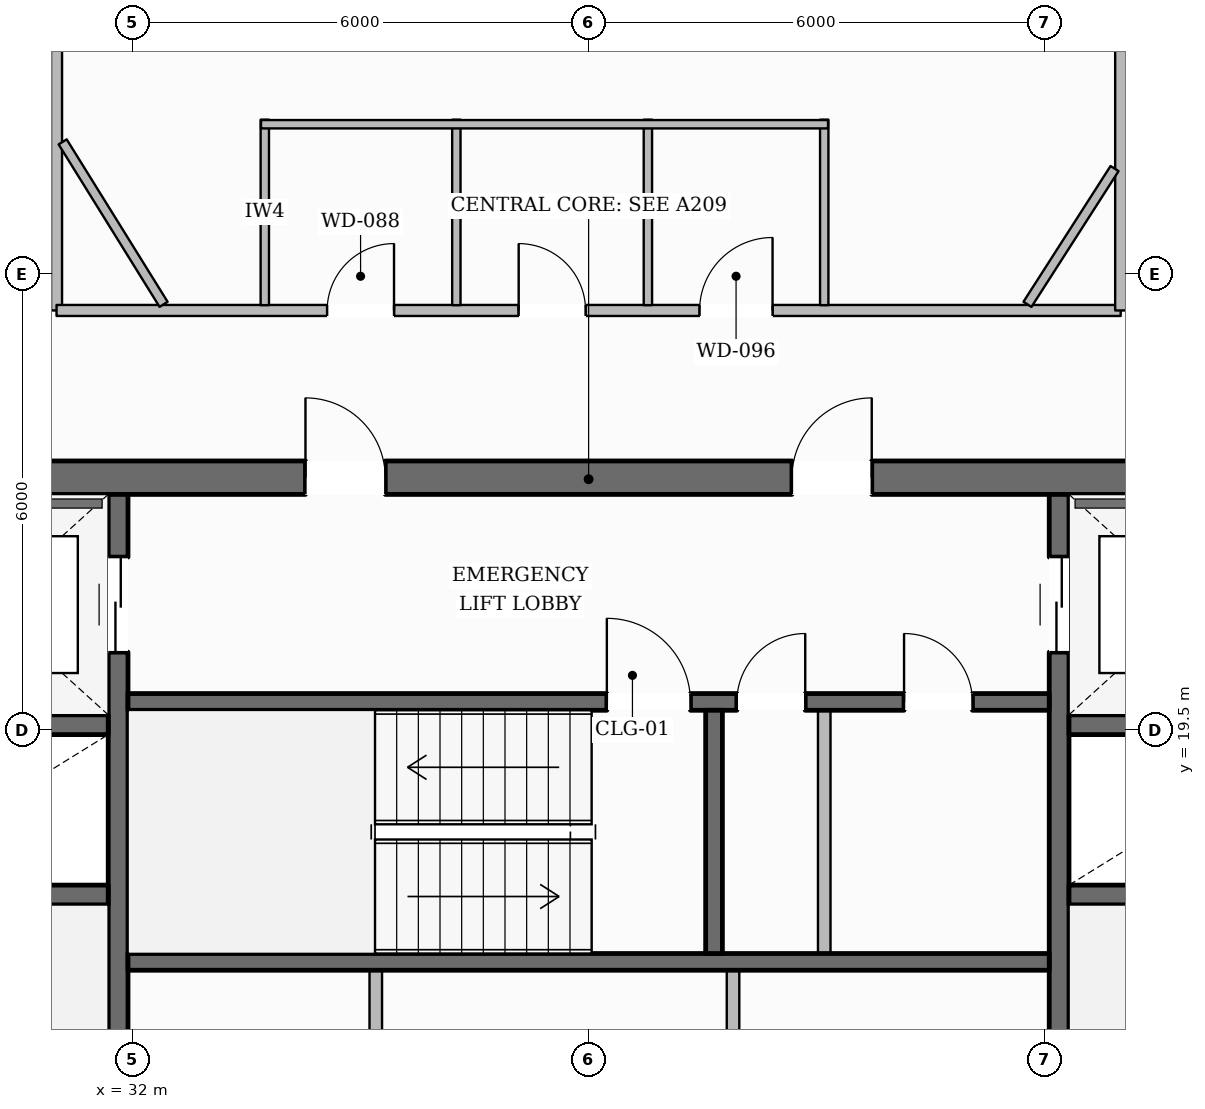
"""IFC4 building model, lengths in metres.
Left out: names, types, materials, properties, quantities, classifications, styles, units other than length and angle.
Written with IfcOpenShell. Run it as: python <this file> out.ifc"""

import sys

from ifc_helpers import new_model, si_unit, direction, frame, frame_2d, origin, place, context, subcontext, project, spatial, rectangle, extrude, element, fill, save


model = new_model("IFC4")
c1 = context("Model", 3, precision=1e-05, world=origin(), true_north=direction((0.0, 1.0)))
c2 = subcontext(c1, "Body", "Model", "MODEL_VIEW")
j1 = project(units=[si_unit("LENGTHUNIT", "METRE"), si_unit("PLANEANGLEUNIT", "RADIAN")], contexts=[c1])
p1 = place(None, origin())
s1 = spatial("IfcSite", under=j1, at=p1, CompositionType="ELEMENT")
p2 = place(p1, origin())
s2 = spatial("IfcBuilding", under=s1, at=p2, CompositionType="ELEMENT")
p3 = place(p2, frame((0.0, 0.0, 195.8)))
s3 = spatial("IfcBuildingStorey", under=s2, at=p3, CompositionType="ELEMENT", Elevation=195.8)
p4 = place(p3, frame((28.04, 22.82, 0.0), z_axis=(0.0, 0.0, 1.0), x_axis=(1.0, 0.0, 0.0)))
e1 = element("IfcWall", 1, at=p4, inside=s3, PredefinedType="SOLIDWALL", context=c2, shape_type="SweptSolid", body=[
    extrude(rectangle(XDim=19.92, YDim=0.44, at=frame_2d((9.96, 0.0))), origin(), (0.0, 0.0, 1.0), 3.6),
])
p5 = place(p4, frame((6.235, 0.0, 0.0)))
e2 = element("IfcOpeningElement", 2, at=p5, cuts=e1, PredefinedType="OPENING", context=c2, shape_type="SweptSolid", body=[
    extrude(rectangle(XDim=1.05, YDim=2.15, at=frame_2d((0.525, 1.075))), frame((0.0, 0.23, 0.0), z_axis=(0.0, -1.0, 0.0), x_axis=(1.0, 0.0, 0.0)), (0.0, 0.0, 1.0), 0.46),
])
p6 = place(p4, frame((12.635, 0.0, 0.0)))
e3 = element("IfcOpeningElement", 3, at=p6, cuts=e1, PredefinedType="OPENING", context=c2, shape_type="SweptSolid", body=[
    extrude(rectangle(XDim=1.05, YDim=2.15, at=frame_2d((0.525, 1.075))), frame((0.0, 0.23, 0.0), z_axis=(0.0, -1.0, 0.0), x_axis=(1.0, 0.0, 0.0)), (0.0, 0.0, 1.0), 0.46),
])
p7 = place(p3, frame((31.81, 9.6, 0.0), z_axis=(0.0, 0.0, 1.0), x_axis=(0.0, 1.0, 0.0)))
e4 = element("IfcWall", 4, at=p7, inside=s3, PredefinedType="SHEAR", context=c2, shape_type="SweptSolid", body=[
    extrude(rectangle(XDim=13.0, YDim=0.26, at=frame_2d((6.5, 0.0))), origin(), (0.0, 0.0, 1.0), 3.6),
])
p8 = place(p7, frame((10.925, 0.0, 0.0)))
e5 = element("IfcOpeningElement", 5, at=p8, cuts=e4, PredefinedType="OPENING", context=c2, shape_type="SweptSolid", body=[
    extrude(rectangle(XDim=1.25, YDim=2.25, at=frame_2d((0.625, 1.125))), frame((0.0, 0.14, 0.0), z_axis=(0.0, -1.0, 0.0), x_axis=(1.0, 0.0, 0.0)), (0.0, 0.0, 1.0), 0.28),
])
p9 = place(p3, frame((44.19, 9.6, 0.0), z_axis=(0.0, 0.0, 1.0), x_axis=(0.0, 1.0, 0.0)))
e6 = element("IfcWall", 6, at=p9, inside=s3, PredefinedType="SHEAR", context=c2, shape_type="SweptSolid", body=[
    extrude(rectangle(XDim=13.0, YDim=0.26, at=frame_2d((6.5, 0.0))), origin(), (0.0, 0.0, 1.0), 3.6),
])
p10 = place(p9, frame((10.925, 0.0, 0.0)))
e7 = element("IfcOpeningElement", 7, at=p10, cuts=e6, PredefinedType="OPENING", context=c2, shape_type="SweptSolid", body=[
    extrude(rectangle(XDim=1.25, YDim=2.25, at=frame_2d((0.625, 1.125))), frame((0.0, 0.14, 0.0), z_axis=(0.0, -1.0, 0.0), x_axis=(1.0, 0.0, 0.0)), (0.0, 0.0, 1.0), 0.28),
])
for number, where, z_axis, x_axis in (
    (8, (28.48, 17.33, 0.0), (0.0, 0.0, 1.0), (1.0, 0.0, 0.0)),
    (9, (28.48, 19.57, 0.0), (0.0, 0.0, 1.0), (1.0, 0.0, 0.0)),
    (10, (44.32, 17.33, 0.0), (0.0, 0.0, 1.0), (1.0, 0.0, 0.0)),
    (11, (44.32, 19.57, 0.0), (0.0, 0.0, 1.0), (1.0, 0.0, 0.0)),
):
    element("IfcWall", number, at=place(p3, frame(where, z_axis=z_axis, x_axis=x_axis)), inside=s3, PredefinedType="SHEAR", context=c2, shape_type="SweptSolid", body=[
        extrude(rectangle(XDim=3.2, YDim=0.26, at=frame_2d((1.6, 0.0))), origin(), (0.0, 0.0, 1.0), 3.6),
    ])
p11 = place(p3, frame((31.94, 19.87, 0.0), z_axis=(0.0, 0.0, 1.0), x_axis=(1.0, 0.0, 0.0)))
e12 = element("IfcWall", 12, at=p11, inside=s3, PredefinedType="SOLIDWALL", context=c2, shape_type="SweptSolid", body=[
    extrude(rectangle(XDim=12.12, YDim=0.22, at=frame_2d((6.06, 0.0))), origin(), (0.0, 0.0, 1.0), 3.6),
])
p12 = place(p11, frame((6.3, 0.0, 0.0)))
e13 = element("IfcOpeningElement", 13, at=p12, cuts=e12, PredefinedType="OPENING", context=c2, shape_type="SweptSolid", body=[
    extrude(rectangle(XDim=1.1, YDim=2.15, at=frame_2d((0.55, 1.075))), frame((0.0, 0.12, 0.0), z_axis=(0.0, -1.0, 0.0), x_axis=(1.0, 0.0, 0.0)), (0.0, 0.0, 1.0), 0.24),
])
p13 = place(p11, frame((8.01, 0.0, 0.0)))
e14 = element("IfcOpeningElement", 14, at=p13, cuts=e12, PredefinedType="OPENING", context=c2, shape_type="SweptSolid", body=[
    extrude(rectangle(XDim=0.9, YDim=2.1, at=frame_2d((0.45, 1.05))), frame((0.0, 0.12, 0.0), z_axis=(0.0, -1.0, 0.0), x_axis=(1.0, 0.0, 0.0)), (0.0, 0.0, 1.0), 0.24),
])
p14 = place(p11, frame((10.21, 0.0, 0.0)))
e15 = element("IfcOpeningElement", 15, at=p14, cuts=e12, PredefinedType="OPENING", context=c2, shape_type="SweptSolid", body=[
    extrude(rectangle(XDim=0.9, YDim=2.1, at=frame_2d((0.45, 1.05))), frame((0.0, 0.12, 0.0), z_axis=(0.0, -1.0, 0.0), x_axis=(1.0, 0.0, 0.0)), (0.0, 0.0, 1.0), 0.24),
])
p15 = place(p3, frame((31.94, 16.45, 0.0), z_axis=(0.0, 0.0, 1.0), x_axis=(1.0, 0.0, 0.0)))
e16 = element("IfcWall", 16, at=p15, inside=s3, PredefinedType="SOLIDWALL", context=c2, shape_type="SweptSolid", body=[
    extrude(rectangle(XDim=12.12, YDim=0.22, at=frame_2d((6.06, 0.0))), origin(), (0.0, 0.0, 1.0), 3.6),
])
p16 = place(p3, frame((39.65, 16.56, 0.0), z_axis=(0.0, 0.0, 1.0), x_axis=(0.0, 1.0, 0.0)))
e17 = element("IfcWall", 17, at=p16, inside=s3, PredefinedType="SOLIDWALL", context=c2, shape_type="SweptSolid", body=[
    extrude(rectangle(XDim=3.2, YDim=0.22, at=frame_2d((1.6, 0.0))), origin(), (0.0, 0.0, 1.0), 3.6),
])
p17 = place(p3, frame((14.773, 11.555, 0.0), z_axis=(0.0, 0.0, 1.0), x_axis=(0.502113441051, 0.864801764751, 0.0)))
e18 = element("IfcWall", 18, at=p17, inside=s3, PredefinedType="STANDARD", context=c2, shape_type="SweptSolid", body=[
    extrude(rectangle(XDim=37.618, YDim=0.35, at=frame_2d((18.809, 0.0))), origin(), (0.0, 0.0, 1.0), 3.132),
])
p18 = place(p17, frame((33.36, 0.0, 0.65)))
e19 = element("IfcOpeningElement", 19, at=p18, cuts=e18, PredefinedType="OPENING", context=c2, shape_type="SweptSolid", body=[
    extrude(rectangle(XDim=1.45, YDim=1.75, at=frame_2d((0.725, 0.875))), frame((0.0, 0.185, 0.0), z_axis=(0.0, -1.0, 0.0), x_axis=(1.0, 0.0, 0.0)), (0.0, 0.0, 1.0), 0.37),
])
p19 = place(p17, frame((27.25, 0.0, 0.65)))
e20 = element("IfcOpeningElement", 20, at=p19, cuts=e18, PredefinedType="OPENING", context=c2, shape_type="SweptSolid", body=[
    extrude(rectangle(XDim=1.45, YDim=1.75, at=frame_2d((0.725, 0.875))), frame((0.0, 0.185, 0.0), z_axis=(0.0, -1.0, 0.0), x_axis=(1.0, 0.0, 0.0)), (0.0, 0.0, 1.0), 0.37),
])
p20 = place(p17, frame((15.03, 0.0, 0.65)))
e21 = element("IfcOpeningElement", 21, at=p20, cuts=e18, PredefinedType="OPENING", context=c2, shape_type="SweptSolid", body=[
    extrude(rectangle(XDim=1.45, YDim=1.75, at=frame_2d((0.725, 0.875))), frame((0.0, 0.185, 0.0), z_axis=(0.0, -1.0, 0.0), x_axis=(1.0, 0.0, 0.0)), (0.0, 0.0, 1.0), 0.37),
])
p21 = place(p17, frame((8.92, 0.0, 0.65)))
e22 = element("IfcOpeningElement", 22, at=p21, cuts=e18, PredefinedType="OPENING", context=c2, shape_type="SweptSolid", body=[
    extrude(rectangle(XDim=1.45, YDim=1.75, at=frame_2d((0.725, 0.875))), frame((0.0, 0.185, 0.0), z_axis=(0.0, -1.0, 0.0), x_axis=(1.0, 0.0, 0.0)), (0.0, 0.0, 1.0), 0.37),
])
p22 = place(p17, frame((2.811, 0.0, 0.65)))
e23 = element("IfcOpeningElement", 23, at=p22, cuts=e18, PredefinedType="OPENING", context=c2, shape_type="SweptSolid", body=[
    extrude(rectangle(XDim=1.45, YDim=1.75, at=frame_2d((0.725, 0.875))), frame((0.0, 0.185, 0.0), z_axis=(0.0, -1.0, 0.0), x_axis=(1.0, 0.0, 0.0)), (0.0, 0.0, 1.0), 0.37),
])
p23 = place(p3, frame((42.444, 44.024, 0.0), z_axis=(0.0, 0.0, 1.0), x_axis=(0.507770038723, -0.861492651028, 0.0)))
e24 = element("IfcWall", 24, at=p23, inside=s3, PredefinedType="STANDARD", context=c2, shape_type="SweptSolid", body=[
    extrude(rectangle(XDim=38.049, YDim=0.35, at=frame_2d((19.024, 0.0))), origin(), (0.0, 0.0, 1.0), 3.132),
])
p24 = place(p23, frame((33.752, 0.0, 0.65)))
e25 = element("IfcOpeningElement", 25, at=p24, cuts=e24, PredefinedType="OPENING", context=c2, shape_type="SweptSolid", body=[
    extrude(rectangle(XDim=1.45, YDim=1.75, at=frame_2d((0.725, 0.875))), frame((0.0, 0.185, 0.0), z_axis=(0.0, -1.0, 0.0), x_axis=(1.0, 0.0, 0.0)), (0.0, 0.0, 1.0), 0.37),
])
p25 = place(p23, frame((27.569, 0.0, 0.65)))
e26 = element("IfcOpeningElement", 26, at=p25, cuts=e24, PredefinedType="OPENING", context=c2, shape_type="SweptSolid", body=[
    extrude(rectangle(XDim=1.45, YDim=1.75, at=frame_2d((0.725, 0.875))), frame((0.0, 0.185, 0.0), z_axis=(0.0, -1.0, 0.0), x_axis=(1.0, 0.0, 0.0)), (0.0, 0.0, 1.0), 0.37),
])
p26 = place(p23, frame((15.204, 0.0, 0.65)))
e27 = element("IfcOpeningElement", 27, at=p26, cuts=e24, PredefinedType="OPENING", context=c2, shape_type="SweptSolid", body=[
    extrude(rectangle(XDim=1.45, YDim=1.75, at=frame_2d((0.725, 0.875))), frame((0.0, 0.185, 0.0), z_axis=(0.0, -1.0, 0.0), x_axis=(1.0, 0.0, 0.0)), (0.0, 0.0, 1.0), 0.37),
])
p27 = place(p23, frame((9.021, 0.0, 0.65)))
e28 = element("IfcOpeningElement", 28, at=p27, cuts=e24, PredefinedType="OPENING", context=c2, shape_type="SweptSolid", body=[
    extrude(rectangle(XDim=1.45, YDim=1.75, at=frame_2d((0.725, 0.875))), frame((0.0, 0.185, 0.0), z_axis=(0.0, -1.0, 0.0), x_axis=(1.0, 0.0, 0.0)), (0.0, 0.0, 1.0), 0.37),
])
p28 = place(p23, frame((2.839, 0.0, 0.65)))
e29 = element("IfcOpeningElement", 29, at=p28, cuts=e24, PredefinedType="OPENING", context=c2, shape_type="SweptSolid", body=[
    extrude(rectangle(XDim=1.45, YDim=1.75, at=frame_2d((0.725, 0.875))), frame((0.0, 0.185, 0.0), z_axis=(0.0, -1.0, 0.0), x_axis=(1.0, 0.0, 0.0)), (0.0, 0.0, 1.0), 0.37),
])
for number, where, z_axis, x_axis in (
    (30, (35.2, 14.1, 0.0), (0.0, 0.0, 1.0), (0.0, 1.0, 0.0)),
    (31, (39.9, 14.1, 0.0), (0.0, 0.0, 1.0), (0.0, 1.0, 0.0)),
):
    element("IfcWall", number, at=place(p3, frame(where, z_axis=z_axis, x_axis=x_axis)), inside=s3, PredefinedType="PARTITIONING", context=c2, shape_type="SweptSolid", body=[
        extrude(rectangle(XDim=2.24, YDim=0.165, at=frame_2d((1.12, 0.0))), origin(), (0.0, 0.0, 1.0), 3.6),
    ])
p29 = place(p3, frame((41.1, 16.56, 0.0), z_axis=(0.0, 0.0, 1.0), x_axis=(0.0, 1.0, 0.0)))
e32 = element("IfcWall", 32, at=p29, inside=s3, PredefinedType="PARTITIONING", context=c2, shape_type="SweptSolid", body=[
    extrude(rectangle(XDim=3.2, YDim=0.165, at=frame_2d((1.6, 0.0))), origin(), (0.0, 0.0, 1.0), 3.6),
])
p30 = place(p3, frame((31.0, 33.409, 0.0), z_axis=(0.0, 0.0, 1.0), x_axis=(0.0, -1.0, 0.0)))
e33 = element("IfcWall", 33, at=p30, inside=s3, PredefinedType="PARTITIONING", context=c2, shape_type="SweptSolid", body=[
    extrude(rectangle(XDim=8.389, YDim=0.145, at=frame_2d((4.194, 0.0))), origin(), (0.0, 0.0, 1.0), 3.6),
])
p31 = place(p3, frame((31.0, 25.02, 0.0), z_axis=(0.0, 0.0, 1.0), x_axis=(1.0, 0.0, 0.0)))
e34 = element("IfcWall", 34, at=p31, inside=s3, PredefinedType="PARTITIONING", context=c2, shape_type="SweptSolid", body=[
    extrude(rectangle(XDim=14.0, YDim=0.145, at=frame_2d((7.0, 0.0))), origin(), (0.0, 0.0, 1.0), 3.6),
])
p32 = place(p31, frame((3.56, 0.0, 0.0)))
e35 = element("IfcOpeningElement", 35, at=p32, cuts=e34, PredefinedType="OPENING", context=c2, shape_type="SweptSolid", body=[
    extrude(rectangle(XDim=0.88, YDim=2.1, at=frame_2d((0.44, 1.05))), frame((0.0, 0.083, 0.0), z_axis=(0.0, -1.0, 0.0), x_axis=(1.0, 0.0, 0.0)), (0.0, 0.0, 1.0), 0.165),
])
p33 = place(p31, frame((6.08, 0.0, 0.0)))
e36 = element("IfcOpeningElement", 36, at=p33, cuts=e34, PredefinedType="OPENING", context=c2, shape_type="SweptSolid", body=[
    extrude(rectangle(XDim=0.88, YDim=2.1, at=frame_2d((0.44, 1.05))), frame((0.0, 0.083, 0.0), z_axis=(0.0, -1.0, 0.0), x_axis=(1.0, 0.0, 0.0)), (0.0, 0.0, 1.0), 0.165),
])
p34 = place(p31, frame((8.46, 0.0, 0.0)))
e37 = element("IfcOpeningElement", 37, at=p34, cuts=e34, PredefinedType="OPENING", context=c2, shape_type="SweptSolid", body=[
    extrude(rectangle(XDim=0.96, YDim=2.1, at=frame_2d((0.48, 1.05))), frame((0.0, 0.083, 0.0), z_axis=(0.0, -1.0, 0.0), x_axis=(1.0, 0.0, 0.0)), (0.0, 0.0, 1.0), 0.165),
])
p35 = place(p3, frame((45.0, 25.02, 0.0), z_axis=(0.0, 0.0, 1.0), x_axis=(0.0, 1.0, 0.0)))
e38 = element("IfcWall", 38, at=p35, inside=s3, PredefinedType="PARTITIONING", context=c2, shape_type="SweptSolid", body=[
    extrude(rectangle(XDim=8.642, YDim=0.145, at=frame_2d((4.321, 0.0))), origin(), (0.0, 0.0, 1.0), 3.6),
])
p36 = place(p35, frame((4.529, 0.0, 0.0)))
e39 = element("IfcOpeningElement", 39, at=p36, cuts=e38, PredefinedType="OPENING", context=c2, shape_type="SweptSolid", body=[
    extrude(rectangle(XDim=1.4, YDim=2.2, at=frame_2d((0.7, 1.1))), frame((0.0, 0.083, 0.0), z_axis=(0.0, -1.0, 0.0), x_axis=(1.0, 0.0, 0.0)), (0.0, 0.0, 1.0), 0.165),
])
p37 = place(p3, frame((33.74, 25.09, 0.0), z_axis=(0.0, 0.0, 1.0), x_axis=(0.0, 1.0, 0.0)))
e40 = element("IfcWall", 40, at=p37, inside=s3, PredefinedType="PLUMBINGWALL", context=c2, shape_type="SweptSolid", body=[
    extrude(rectangle(XDim=2.44, YDim=0.11, at=frame_2d((1.22, 0.0))), origin(), (0.0, 0.0, 1.0), 3.141),
])
for number, where, z_axis, x_axis in (
    (41, (36.26, 25.09, 0.0), (0.0, 0.0, 1.0), (0.0, 1.0, 0.0)),
    (42, (38.78, 25.09, 0.0), (0.0, 0.0, 1.0), (0.0, 1.0, 0.0)),
    (43, (41.1, 25.09, 0.0), (0.0, 0.0, 1.0), (0.0, 1.0, 0.0)),
):
    element("IfcWall", number, at=place(p3, frame(where, z_axis=z_axis, x_axis=x_axis)), inside=s3, PredefinedType="PLUMBINGWALL", context=c2, shape_type="SweptSolid", body=[
        extrude(rectangle(XDim=2.44, YDim=0.11, at=frame_2d((1.22, 0.0))), origin(), (0.0, 0.0, 1.0), 3.6),
    ])
p38 = place(p3, frame((33.69, 27.47, 0.0), z_axis=(0.0, 0.0, 1.0), x_axis=(1.0, 0.0, 0.0)))
e44 = element("IfcWall", 44, at=p38, inside=s3, PredefinedType="PLUMBINGWALL", context=c2, shape_type="SweptSolid", body=[
    extrude(rectangle(XDim=7.46, YDim=0.11, at=frame_2d((3.73, 0.0))), origin(), (0.0, 0.0, 1.0), 3.6),
])
p39 = place(p3, frame((43.774, 25.101, 0.0), z_axis=(0.0, 0.0, 1.0), x_axis=(0.539879343567, 0.8417424157, 0.0)))
e45 = element("IfcWall", 45, at=p39, inside=s3, PredefinedType="PARTITIONING", context=c2, shape_type="SweptSolid", body=[
    extrude(rectangle(XDim=2.122, YDim=0.125, at=frame_2d((1.061, 0.0))), origin(), (0.0, 0.0, 1.0), 3.6),
])
p40 = place(p3, frame((32.408, 25.101, 0.0), z_axis=(0.0, 0.0, 1.0), x_axis=(-0.527746847309, 0.84940171012, 0.0)))
e46 = element("IfcWall", 46, at=p40, inside=s3, PredefinedType="PARTITIONING", context=c2, shape_type="SweptSolid", body=[
    extrude(rectangle(XDim=2.516, YDim=0.125, at=frame_2d((1.258, 0.0))), origin(), (0.0, 0.0, 1.0), 3.6),
])
p41 = place(p12, origin())
e47 = element("IfcDoor", 47, at=p41, inside=s3, OperationType="SINGLE_SWING_LEFT", PredefinedType="DOOR", context=c2, shape_type="SweptSolid", body=[
    extrude(rectangle(XDim=1.1, YDim=2.15, at=frame_2d((0.55, 1.075))), frame((0.0, 0.025, 0.0), z_axis=(0.0, -1.0, 0.0), x_axis=(1.0, 0.0, 0.0)), (0.0, 0.0, 1.0), 0.05),
])
fill(e13, e47)
p42 = place(p5, origin())
e48 = element("IfcDoor", 48, at=p42, inside=s3, OperationType="SINGLE_SWING_LEFT", PredefinedType="DOOR", context=c2, shape_type="SweptSolid", body=[
    extrude(rectangle(XDim=1.05, YDim=2.15, at=frame_2d((0.525, 1.075))), frame((0.0, 0.025, 0.0), z_axis=(0.0, -1.0, 0.0), x_axis=(1.0, 0.0, 0.0)), (0.0, 0.0, 1.0), 0.05),
])
fill(e2, e48)
p43 = place(p6, origin())
e49 = element("IfcDoor", 49, at=p43, inside=s3, OperationType="SINGLE_SWING_RIGHT", PredefinedType="DOOR", context=c2, shape_type="SweptSolid", body=[
    extrude(rectangle(XDim=1.05, YDim=2.15, at=frame_2d((0.525, 1.075))), frame((0.0, 0.025, 0.0), z_axis=(0.0, -1.0, 0.0), x_axis=(1.0, 0.0, 0.0)), (0.0, 0.0, 1.0), 0.05),
])
fill(e3, e49)
p44 = place(p8, origin())
e50 = element("IfcDoor", 50, at=p44, inside=s3, OperationType="DOUBLE_DOOR_SLIDING", PredefinedType="DOOR", context=c2, shape_type="SweptSolid", body=[
    extrude(rectangle(XDim=1.25, YDim=2.25, at=frame_2d((0.625, 1.125))), frame((0.0, 0.025, 0.0), z_axis=(0.0, -1.0, 0.0), x_axis=(1.0, 0.0, 0.0)), (0.0, 0.0, 1.0), 0.05),
])
fill(e5, e50)
p45 = place(p10, origin())
e51 = element("IfcDoor", 51, at=p45, inside=s3, OperationType="DOUBLE_DOOR_SLIDING", PredefinedType="DOOR", context=c2, shape_type="SweptSolid", body=[
    extrude(rectangle(XDim=1.25, YDim=2.25, at=frame_2d((0.625, 1.125))), frame((0.0, 0.025, 0.0), z_axis=(0.0, -1.0, 0.0), x_axis=(1.0, 0.0, 0.0)), (0.0, 0.0, 1.0), 0.05),
])
fill(e7, e51)
p46 = place(p13, origin())
e52 = element("IfcDoor", 52, at=p46, inside=s3, OperationType="SINGLE_SWING_RIGHT", PredefinedType="DOOR", context=c2, shape_type="SweptSolid", body=[
    extrude(rectangle(XDim=0.9, YDim=2.1, at=frame_2d((0.45, 1.05))), frame((0.0, 0.025, 0.0), z_axis=(0.0, -1.0, 0.0), x_axis=(1.0, 0.0, 0.0)), (0.0, 0.0, 1.0), 0.05),
])
fill(e14, e52)
p47 = place(p14, origin())
e53 = element("IfcDoor", 53, at=p47, inside=s3, OperationType="SINGLE_SWING_LEFT", PredefinedType="DOOR", context=c2, shape_type="SweptSolid", body=[
    extrude(rectangle(XDim=0.9, YDim=2.1, at=frame_2d((0.45, 1.05))), frame((0.0, 0.025, 0.0), z_axis=(0.0, -1.0, 0.0), x_axis=(1.0, 0.0, 0.0)), (0.0, 0.0, 1.0), 0.05),
])
fill(e15, e53)
p48 = place(p32, origin())
e54 = element("IfcDoor", 54, at=p48, inside=s3, OperationType="SINGLE_SWING_RIGHT", PredefinedType="DOOR", context=c2, shape_type="SweptSolid", body=[
    extrude(rectangle(XDim=0.88, YDim=2.1, at=frame_2d((0.44, 1.05))), frame((0.0, 0.025, 0.0), z_axis=(0.0, -1.0, 0.0), x_axis=(1.0, 0.0, 0.0)), (0.0, 0.0, 1.0), 0.05),
])
fill(e35, e54)
p49 = place(p33, origin())
e55 = element("IfcDoor", 55, at=p49, inside=s3, OperationType="SINGLE_SWING_LEFT", PredefinedType="DOOR", context=c2, shape_type="SweptSolid", body=[
    extrude(rectangle(XDim=0.88, YDim=2.1, at=frame_2d((0.44, 1.05))), frame((0.0, 0.025, 0.0), z_axis=(0.0, -1.0, 0.0), x_axis=(1.0, 0.0, 0.0)), (0.0, 0.0, 1.0), 0.05),
])
fill(e36, e55)
p50 = place(p34, origin())
e56 = element("IfcDoor", 56, at=p50, inside=s3, OperationType="SINGLE_SWING_RIGHT", PredefinedType="DOOR", context=c2, shape_type="SweptSolid", body=[
    extrude(rectangle(XDim=0.96, YDim=2.1, at=frame_2d((0.48, 1.05))), frame((0.0, 0.025, 0.0), z_axis=(0.0, -1.0, 0.0), x_axis=(1.0, 0.0, 0.0)), (0.0, 0.0, 1.0), 0.05),
])
fill(e37, e56)
save(model, sys.argv[1])
